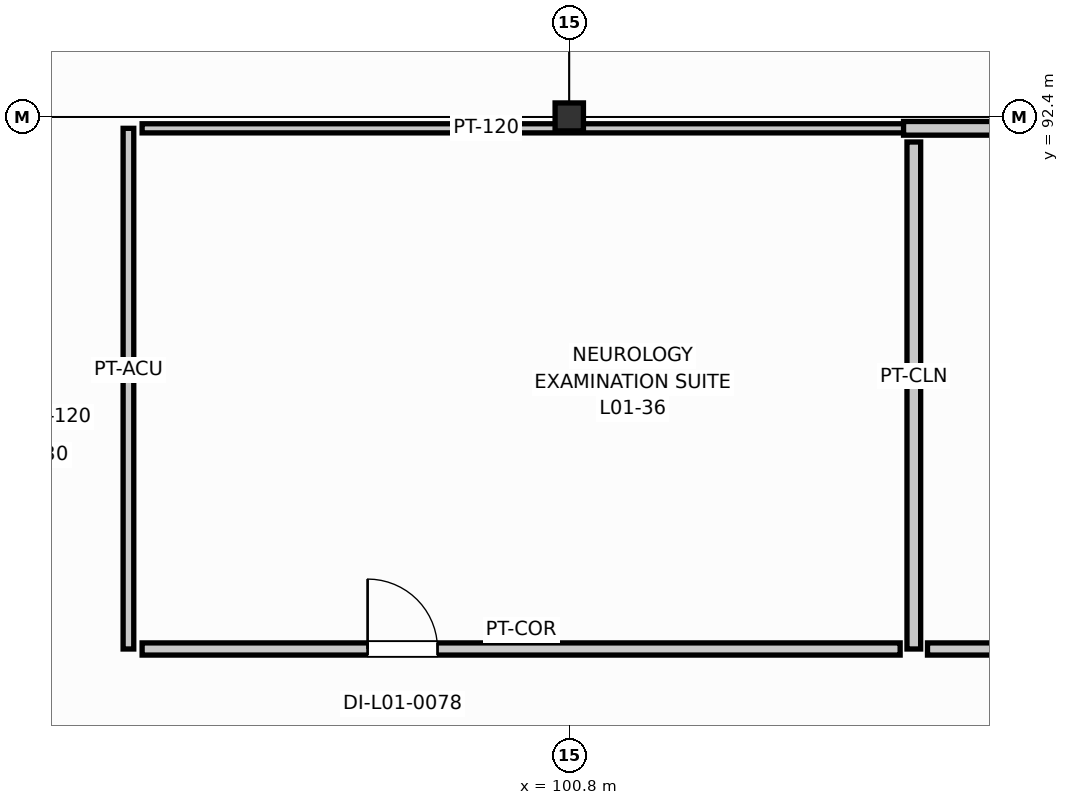
"""IFC4 building model, lengths in metres.
Left out: names, types, materials, properties, quantities, classifications, styles, units other than length and angle.
Written with IfcOpenShell. Run it as: python <this file> out.ifc"""

import sys

from ifc_helpers import new_model, si_unit, direction, frame, frame_2d, origin, origin_2d, place, context, subcontext, project, spatial, rectangle, i_section, extrude, element, fill, save


model = new_model("IFC4")
c1 = context("Model", 3, precision=1e-05, world=origin(), true_north=direction((0.0, 1.0)))
c2 = subcontext(c1, "Body", "Model", "MODEL_VIEW")
j1 = project(units=[si_unit("LENGTHUNIT", "METRE"), si_unit("PLANEANGLEUNIT", "RADIAN")], contexts=[c1])
p1 = place(None, origin())
s1 = spatial("IfcSite", under=j1, at=p1, CompositionType="ELEMENT")
p2 = place(p1, origin())
s2 = spatial("IfcBuilding", under=s1, at=p2, CompositionType="ELEMENT")
p3 = place(p2, frame((0.0, 0.0, 4.8)))
s3 = spatial("IfcBuildingStorey", under=s2, at=p3, CompositionType="ELEMENT", Elevation=4.8)
p4 = place(p3, frame((100.8, 92.4, 0.0), z_axis=(0.0, 0.0, 1.0), x_axis=(1.0, 0.0, 0.0)))
e1 = element("IfcColumn", 1, at=p4, inside=s3, PredefinedType="COLUMN", context=c2, shape_type="SweptSolid", body=[
    extrude(i_section(OverallWidth=0.373, OverallDepth=0.368, WebThickness=0.015, FlangeThickness=0.024, FilletRadius=0.02, at=origin_2d()), origin(), (0.0, 0.0, 1.0), 4.2),
])
p5 = place(p3, frame((95.0, 85.4, 0.0), z_axis=(0.0, 0.0, 1.0), x_axis=(0.0, 1.0, 0.0)))
e2 = element("IfcWall", 2, at=p5, inside=s3, PredefinedType="PARTITIONING", context=c2, shape_type="SweptSolid", body=[
    extrude(rectangle(XDim=6.85, YDim=0.14, at=frame_2d((3.425, 0.0))), origin(), (0.0, 0.0, 1.0), 3.532),
])
p6 = place(p3, frame((95.18, 92.25, 0.0), z_axis=(0.0, 0.0, 1.0), x_axis=(1.0, 0.0, 0.0)))
e3 = element("IfcWall", 3, at=p6, inside=s3, PredefinedType="PARTITIONING", context=c2, shape_type="SweptSolid", body=[
    extrude(rectangle(XDim=10.153, YDim=0.12, at=frame_2d((5.077, 0.0))), origin(), (0.0, 0.0, 1.0), 3.094),
])
p7 = place(p3, frame((105.333, 92.07, 0.0), z_axis=(0.0, 0.0, 1.0), x_axis=(0.0, -1.0, 0.0)))
e4 = element("IfcWall", 4, at=p7, inside=s3, PredefinedType="PARTITIONING", context=c2, shape_type="SweptSolid", body=[
    extrude(rectangle(XDim=6.67, YDim=0.18, at=frame_2d((3.335, 0.0))), origin(), (0.0, 0.0, 1.0), 3.945),
])
p8 = place(p3, frame((105.153, 85.4, 0.0), z_axis=(0.0, 0.0, 1.0), x_axis=(-1.0, 0.0, 0.0)))
e5 = element("IfcWall", 5, at=p8, inside=s3, PredefinedType="PARTITIONING", context=c2, shape_type="SweptSolid", body=[
    extrude(rectangle(XDim=9.973, YDim=0.16, at=frame_2d((4.987, 0.0))), origin(), (0.0, 0.0, 1.0), 3.094),
])
p9 = place(p8, frame((6.087, 0.0, 0.0)))
e6 = element("IfcOpeningElement", 6, at=p9, cuts=e5, PredefinedType="OPENING", context=c2, shape_type="SweptSolid", body=[
    extrude(rectangle(XDim=0.92, YDim=2.1, at=frame_2d((0.46, 1.05))), frame((0.0, 0.09, 0.0), z_axis=(0.0, -1.0, 0.0), x_axis=(1.0, 0.0, 0.0)), (0.0, 0.0, 1.0), 0.18),
])
p10 = place(p3, frame((105.198, 92.25, 0.0), z_axis=(0.0, 0.0, 1.0), x_axis=(1.0, 0.0, 0.0)))
e7 = element("IfcWall", 7, at=p10, inside=s3, PredefinedType="PARTITIONING", context=c2, shape_type="SweptSolid", body=[
    extrude(rectangle(XDim=10.469, YDim=0.18, at=frame_2d((5.234, 0.0))), origin(), (0.0, 0.0, 1.0), 3.252),
])
p11 = place(p3, frame((115.487, 85.4, 0.0), z_axis=(0.0, 0.0, 1.0), x_axis=(-1.0, 0.0, 0.0)))
e8 = element("IfcWall", 8, at=p11, inside=s3, PredefinedType="PARTITIONING", context=c2, shape_type="SweptSolid", body=[
    extrude(rectangle(XDim=9.974, YDim=0.16, at=frame_2d((4.987, 0.0))), origin(), (0.0, 0.0, 1.0), 3.252),
])
p12 = place(p11, frame((4.657, 0.0, 0.0)))
e9 = element("IfcOpeningElement", 9, at=p12, cuts=e8, PredefinedType="OPENING", context=c2, shape_type="SweptSolid", body=[
    extrude(rectangle(XDim=1.06, YDim=2.05, at=frame_2d((0.53, 1.025))), frame((0.0, 0.09, 0.0), z_axis=(0.0, -1.0, 0.0), x_axis=(1.0, 0.0, 0.0)), (0.0, 0.0, 1.0), 0.18),
])
p13 = place(p9, frame((0.92, 0.0, 0.0), z_axis=(0.0, 0.0, 1.0), x_axis=(-1.0, 0.0, 0.0)))
e10 = element("IfcDoor", 10, at=p13, inside=s3, OperationType="SINGLE_SWING_LEFT", PredefinedType="DOOR", context=c2, shape_type="SweptSolid", body=[
    extrude(rectangle(XDim=0.92, YDim=2.1, at=frame_2d((0.46, 1.05))), frame((0.0, 0.025, 0.0), z_axis=(0.0, -1.0, 0.0), x_axis=(1.0, 0.0, 0.0)), (0.0, 0.0, 1.0), 0.05),
])
fill(e6, e10)
save(model, sys.argv[1])
